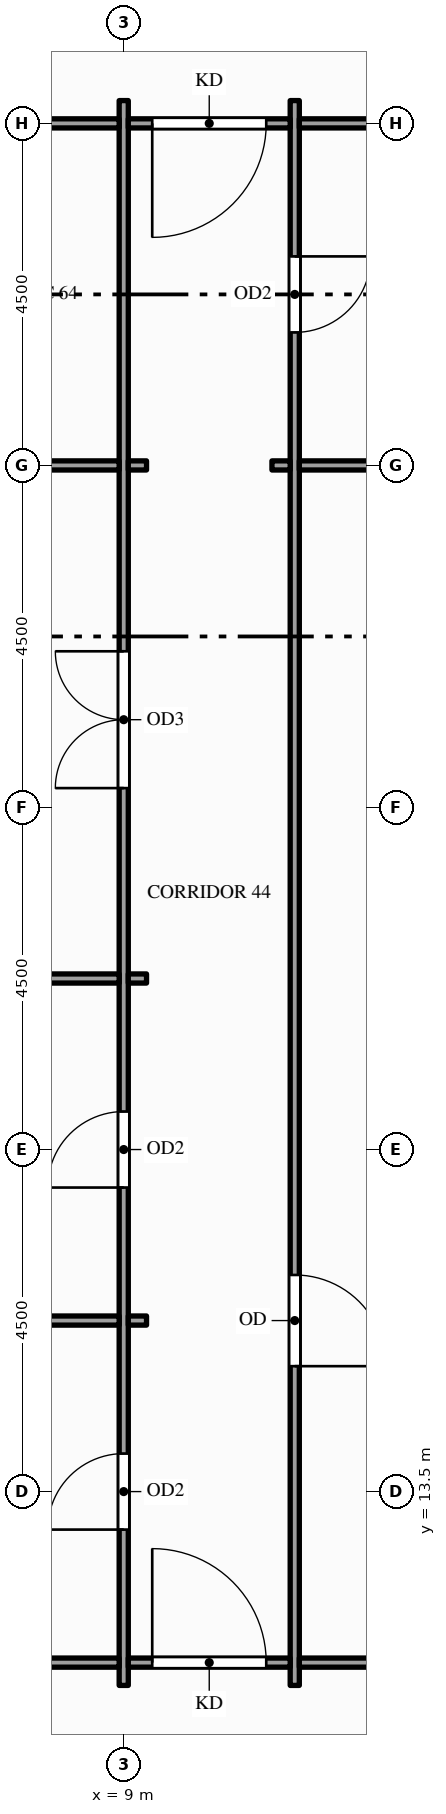
"""IFC4 building model, lengths in metres.
Left out: names, types, materials, properties, quantities, classifications, styles, units other than length and angle.
Written with IfcOpenShell. Run it as: python <this file> out.ifc"""

import sys

from ifc_helpers import new_model, si_unit, direction, frame, frame_2d, origin, place, context, subcontext, project, spatial, rectangle, extrude, element, fill, save


model = new_model("IFC4")
c1 = context("Model", 3, precision=1e-05, world=origin(), true_north=direction((0.0, 1.0)))
c2 = subcontext(c1, "Body", "Model", "MODEL_VIEW")
j1 = project(units=[si_unit("LENGTHUNIT", "METRE"), si_unit("PLANEANGLEUNIT", "RADIAN")], contexts=[c1])
p1 = place(None, origin())
s1 = spatial("IfcSite", under=j1, at=p1, CompositionType="ELEMENT")
p2 = place(p1, origin())
s2 = spatial("IfcBuilding", under=s1, at=p2, CompositionType="ELEMENT")
p3 = place(p2, frame((0.0, 0.0, 139.0)))
s3 = spatial("IfcBuildingStorey", under=s2, at=p3, CompositionType="ELEMENT", Elevation=139.0)
p4 = place(p3, frame((9.0, 10.95, 0.0), z_axis=(0.0, 0.0, 1.0), x_axis=(0.0, 1.0, 0.0)))
e1 = element("IfcWall", 1, at=p4, inside=s3, PredefinedType="PARTITIONING", context=c2, shape_type="SweptSolid", body=[
    extrude(rectangle(XDim=20.85, YDim=0.12, at=frame_2d((10.425, 0.0))), origin(), (0.0, 0.0, 1.0), 2.6),
])
p5 = place(p4, frame((2.05, 0.0, 0.0)))
e2 = element("IfcOpeningElement", 2, at=p5, cuts=e1, PredefinedType="OPENING", context=c2, shape_type="SweptSolid", body=[
    extrude(rectangle(XDim=1.0, YDim=2.1, at=frame_2d((0.5, 1.05))), frame((0.0, 0.07, 0.0), z_axis=(0.0, -1.0, 0.0), x_axis=(1.0, 0.0, 0.0)), (0.0, 0.0, 1.0), 0.14),
])
p6 = place(p4, frame((6.55, 0.0, 0.0)))
e3 = element("IfcOpeningElement", 3, at=p6, cuts=e1, PredefinedType="OPENING", context=c2, shape_type="SweptSolid", body=[
    extrude(rectangle(XDim=1.0, YDim=2.1, at=frame_2d((0.5, 1.05))), frame((0.0, 0.07, 0.0), z_axis=(0.0, -1.0, 0.0), x_axis=(1.0, 0.0, 0.0)), (0.0, 0.0, 1.0), 0.14),
])
p7 = place(p4, frame((11.805, 0.0, 0.0)))
e4 = element("IfcOpeningElement", 4, at=p7, cuts=e1, PredefinedType="OPENING", context=c2, shape_type="SweptSolid", body=[
    extrude(rectangle(XDim=1.8, YDim=2.1, at=frame_2d((0.9, 1.05))), frame((0.0, 0.07, 0.0), z_axis=(0.0, -1.0, 0.0), x_axis=(1.0, 0.0, 0.0)), (0.0, 0.0, 1.0), 0.14),
])
p8 = place(p3, frame((11.25, 10.95, 0.0), z_axis=(0.0, 0.0, 1.0), x_axis=(0.0, 1.0, 0.0)))
e5 = element("IfcWall", 5, at=p8, inside=s3, PredefinedType="PARTITIONING", context=c2, shape_type="SweptSolid", body=[
    extrude(rectangle(XDim=20.85, YDim=0.12, at=frame_2d((10.425, 0.0))), origin(), (0.0, 0.0, 1.0), 2.6),
])
p9 = place(p8, frame((17.8, 0.0, 0.0)))
e6 = element("IfcOpeningElement", 6, at=p9, cuts=e5, PredefinedType="OPENING", context=c2, shape_type="SweptSolid", body=[
    extrude(rectangle(XDim=1.0, YDim=2.1, at=frame_2d((0.5, 1.05))), frame((0.0, 0.07, 0.0), z_axis=(0.0, -1.0, 0.0), x_axis=(1.0, 0.0, 0.0)), (0.0, 0.0, 1.0), 0.14),
])
p10 = place(p8, frame((4.2, 0.0, 0.0)))
e7 = element("IfcOpeningElement", 7, at=p10, cuts=e5, PredefinedType="OPENING", context=c2, shape_type="SweptSolid", body=[
    extrude(rectangle(XDim=1.2, YDim=2.1, at=frame_2d((0.6, 1.05))), frame((0.0, 0.07, 0.0), z_axis=(0.0, -1.0, 0.0), x_axis=(1.0, 0.0, 0.0)), (0.0, 0.0, 1.0), 0.14),
])
p11 = place(p3, frame((0.15, 11.25, 0.0), z_axis=(0.0, 0.0, 1.0), x_axis=(1.0, 0.0, 0.0)))
e8 = element("IfcWall", 8, at=p11, inside=s3, PredefinedType="PARTITIONING", context=c2, shape_type="SweptSolid", body=[
    extrude(rectangle(XDim=8.79, YDim=0.12, at=frame_2d((4.395, 0.0))), origin(), (0.0, 0.0, 1.0), 2.87),
])
p12 = place(p3, frame((9.06, 11.25, 0.0), z_axis=(0.0, 0.0, 1.0), x_axis=(1.0, 0.0, 0.0)))
e9 = element("IfcWall", 9, at=p12, inside=s3, PredefinedType="PARTITIONING", context=c2, shape_type="SweptSolid", body=[
    extrude(rectangle(XDim=2.13, YDim=0.12, at=frame_2d((1.065, 0.0))), origin(), (0.0, 0.0, 1.0), 2.87),
])
p13 = place(p12, frame((0.315, 0.0, 0.0)))
e10 = element("IfcOpeningElement", 10, at=p13, cuts=e9, PredefinedType="OPENING", context=c2, shape_type="SweptSolid", body=[
    extrude(rectangle(XDim=1.5, YDim=2.1, at=frame_2d((0.75, 1.05))), frame((0.0, 0.07, 0.0), z_axis=(0.0, -1.0, 0.0), x_axis=(1.0, 0.0, 0.0)), (0.0, 0.0, 1.0), 0.14),
])
p14 = place(p3, frame((11.31, 11.25, 0.0), z_axis=(0.0, 0.0, 1.0), x_axis=(1.0, 0.0, 0.0)))
e11 = element("IfcWall", 11, at=p14, inside=s3, PredefinedType="PARTITIONING", context=c2, shape_type="SweptSolid", body=[
    extrude(rectangle(XDim=20.04, YDim=0.12, at=frame_2d((10.02, 0.0))), origin(), (0.0, 0.0, 1.0), 2.87),
])
p15 = place(p14, frame((9.165, 0.0, 0.0)))
e12 = element("IfcOpeningElement", 12, at=p15, cuts=e11, PredefinedType="OPENING", context=c2, shape_type="SweptSolid", body=[
    extrude(rectangle(XDim=1.8, YDim=2.1, at=frame_2d((0.9, 1.05))), frame((0.0, 0.07, 0.0), z_axis=(0.0, -1.0, 0.0), x_axis=(1.0, 0.0, 0.0)), (0.0, 0.0, 1.0), 0.14),
])
p16 = place(p3, frame((0.15, 15.75, 0.0), z_axis=(0.0, 0.0, 1.0), x_axis=(1.0, 0.0, 0.0)))
e13 = element("IfcWall", 13, at=p16, inside=s3, PredefinedType="PARTITIONING", context=c2, shape_type="SweptSolid", body=[
    extrude(rectangle(XDim=8.79, YDim=0.12, at=frame_2d((4.395, 0.0))), origin(), (0.0, 0.0, 1.0), 2.87),
])
p17 = place(p3, frame((9.06, 15.75, 0.0), z_axis=(0.0, 0.0, 1.0), x_axis=(1.0, 0.0, 0.0)))
e14 = element("IfcWall", 14, at=p17, inside=s3, PredefinedType="PARTITIONING", context=c2, shape_type="SweptSolid", body=[
    extrude(rectangle(XDim=0.24, YDim=0.12, at=frame_2d((0.12, 0.0))), origin(), (0.0, 0.0, 1.0), 2.87),
])
p18 = place(p3, frame((0.15, 20.25, 0.0), z_axis=(0.0, 0.0, 1.0), x_axis=(1.0, 0.0, 0.0)))
e15 = element("IfcWall", 15, at=p18, inside=s3, PredefinedType="PARTITIONING", context=c2, shape_type="SweptSolid", body=[
    extrude(rectangle(XDim=8.79, YDim=0.12, at=frame_2d((4.395, 0.0))), origin(), (0.0, 0.0, 1.0), 2.87),
])
p19 = place(p3, frame((9.06, 20.25, 0.0), z_axis=(0.0, 0.0, 1.0), x_axis=(1.0, 0.0, 0.0)))
e16 = element("IfcWall", 16, at=p19, inside=s3, PredefinedType="PARTITIONING", context=c2, shape_type="SweptSolid", body=[
    extrude(rectangle(XDim=0.24, YDim=0.12, at=frame_2d((0.12, 0.0))), origin(), (0.0, 0.0, 1.0), 2.87),
])
p20 = place(p3, frame((5.56, 27.0, 0.0), z_axis=(0.0, 0.0, 1.0), x_axis=(1.0, 0.0, 0.0)))
e17 = element("IfcWall", 17, at=p20, inside=s3, PredefinedType="PARTITIONING", context=c2, shape_type="SweptSolid", body=[
    extrude(rectangle(XDim=3.38, YDim=0.12, at=frame_2d((1.69, 0.0))), origin(), (0.0, 0.0, 1.0), 2.87),
])
for number, where, z_axis, x_axis in (
    (18, (9.06, 27.0, 0.0), (0.0, 0.0, 1.0), (1.0, 0.0, 0.0)),
    (19, (10.95, 27.0, 0.0), (0.0, 0.0, 1.0), (1.0, 0.0, 0.0)),
):
    element("IfcWall", number, at=place(p3, frame(where, z_axis=z_axis, x_axis=x_axis)), inside=s3, PredefinedType="PARTITIONING", context=c2, shape_type="SweptSolid", body=[
        extrude(rectangle(XDim=0.24, YDim=0.12, at=frame_2d((0.12, 0.0))), origin(), (0.0, 0.0, 1.0), 2.87),
    ])
p21 = place(p3, frame((11.31, 27.0, 0.0), z_axis=(0.0, 0.0, 1.0), x_axis=(1.0, 0.0, 0.0)))
e20 = element("IfcWall", 20, at=p21, inside=s3, PredefinedType="PARTITIONING", context=c2, shape_type="SweptSolid", body=[
    extrude(rectangle(XDim=9.82, YDim=0.12, at=frame_2d((4.91, 0.0))), origin(), (0.0, 0.0, 1.0), 2.87),
])
p22 = place(p3, frame((5.56, 31.5, 0.0), z_axis=(0.0, 0.0, 1.0), x_axis=(1.0, 0.0, 0.0)))
e21 = element("IfcWall", 21, at=p22, inside=s3, PredefinedType="PARTITIONING", context=c2, shape_type="SweptSolid", body=[
    extrude(rectangle(XDim=3.38, YDim=0.12, at=frame_2d((1.69, 0.0))), origin(), (0.0, 0.0, 1.0), 2.87),
])
p23 = place(p22, frame((1.19, 0.0, 0.0)))
e22 = element("IfcOpeningElement", 22, at=p23, cuts=e21, PredefinedType="OPENING", context=c2, shape_type="SweptSolid", body=[
    extrude(rectangle(XDim=1.0, YDim=2.1, at=frame_2d((0.5, 1.05))), frame((0.0, 0.07, 0.0), z_axis=(0.0, -1.0, 0.0), x_axis=(1.0, 0.0, 0.0)), (0.0, 0.0, 1.0), 0.14),
])
p24 = place(p3, frame((9.06, 31.5, 0.0), z_axis=(0.0, 0.0, 1.0), x_axis=(1.0, 0.0, 0.0)))
e23 = element("IfcWall", 23, at=p24, inside=s3, PredefinedType="PARTITIONING", context=c2, shape_type="SweptSolid", body=[
    extrude(rectangle(XDim=2.13, YDim=0.12, at=frame_2d((1.065, 0.0))), origin(), (0.0, 0.0, 1.0), 2.87),
])
p25 = place(p24, frame((0.315, 0.0, 0.0)))
e24 = element("IfcOpeningElement", 24, at=p25, cuts=e23, PredefinedType="OPENING", context=c2, shape_type="SweptSolid", body=[
    extrude(rectangle(XDim=1.5, YDim=2.1, at=frame_2d((0.75, 1.05))), frame((0.0, 0.07, 0.0), z_axis=(0.0, -1.0, 0.0), x_axis=(1.0, 0.0, 0.0)), (0.0, 0.0, 1.0), 0.14),
])
p26 = place(p3, frame((11.31, 31.5, 0.0), z_axis=(0.0, 0.0, 1.0), x_axis=(1.0, 0.0, 0.0)))
e25 = element("IfcWall", 25, at=p26, inside=s3, PredefinedType="PARTITIONING", context=c2, shape_type="SweptSolid", body=[
    extrude(rectangle(XDim=9.54, YDim=0.12, at=frame_2d((4.77, 0.0))), origin(), (0.0, 0.0, 1.0), 2.87),
])
p27 = place(p13, origin())
e26 = element("IfcDoor", 26, at=p27, inside=s3, OperationType="SINGLE_SWING_LEFT", PredefinedType="DOOR", context=c2, shape_type="SweptSolid", body=[
    extrude(rectangle(XDim=1.5, YDim=2.1, at=frame_2d((0.75, 1.05))), frame((0.0, 0.025, 0.0), z_axis=(0.0, -1.0, 0.0), x_axis=(1.0, 0.0, 0.0)), (0.0, 0.0, 1.0), 0.05),
])
fill(e10, e26)
p28 = place(p25, origin())
e27 = element("IfcDoor", 27, at=p28, inside=s3, OperationType="SINGLE_SWING_LEFT", PredefinedType="DOOR", context=c2, shape_type="SweptSolid", body=[
    extrude(rectangle(XDim=1.5, YDim=2.1, at=frame_2d((0.75, 1.05))), frame((0.0, 0.025, 0.0), z_axis=(0.0, -1.0, 0.0), x_axis=(1.0, 0.0, 0.0)), (0.0, 0.0, 1.0), 0.05),
])
fill(e24, e27)
p29 = place(p5, origin())
e28 = element("IfcDoor", 28, at=p29, inside=s3, OperationType="SINGLE_SWING_LEFT", PredefinedType="DOOR", context=c2, shape_type="SweptSolid", body=[
    extrude(rectangle(XDim=1.0, YDim=2.1, at=frame_2d((0.5, 1.05))), frame((0.0, 0.025, 0.0), z_axis=(0.0, -1.0, 0.0), x_axis=(1.0, 0.0, 0.0)), (0.0, 0.0, 1.0), 0.05),
])
fill(e2, e28)
p30 = place(p6, origin())
e29 = element("IfcDoor", 29, at=p30, inside=s3, OperationType="SINGLE_SWING_LEFT", PredefinedType="DOOR", context=c2, shape_type="SweptSolid", body=[
    extrude(rectangle(XDim=1.0, YDim=2.1, at=frame_2d((0.5, 1.05))), frame((0.0, 0.025, 0.0), z_axis=(0.0, -1.0, 0.0), x_axis=(1.0, 0.0, 0.0)), (0.0, 0.0, 1.0), 0.05),
])
fill(e3, e29)
p31 = place(p7, origin())
e30 = element("IfcDoor", 30, at=p31, inside=s3, OperationType="DOUBLE_DOOR_SINGLE_SWING", PredefinedType="DOOR", context=c2, shape_type="SweptSolid", body=[
    extrude(rectangle(XDim=1.8, YDim=2.1, at=frame_2d((0.9, 1.05))), frame((0.0, 0.025, 0.0), z_axis=(0.0, -1.0, 0.0), x_axis=(1.0, 0.0, 0.0)), (0.0, 0.0, 1.0), 0.05),
])
fill(e4, e30)
p32 = place(p9, origin())
e31 = element("IfcDoor", 31, at=p32, inside=s3, OperationType="SINGLE_SWING_RIGHT", PredefinedType="DOOR", context=c2, shape_type="SweptSolid", body=[
    extrude(rectangle(XDim=1.0, YDim=2.1, at=frame_2d((0.5, 1.05))), frame((0.0, 0.025, 0.0), z_axis=(0.0, -1.0, 0.0), x_axis=(1.0, 0.0, 0.0)), (0.0, 0.0, 1.0), 0.05),
])
fill(e6, e31)
p33 = place(p10, origin())
e32 = element("IfcDoor", 32, at=p33, inside=s3, OperationType="SINGLE_SWING_LEFT", PredefinedType="DOOR", context=c2, shape_type="SweptSolid", body=[
    extrude(rectangle(XDim=1.2, YDim=2.1, at=frame_2d((0.6, 1.05))), frame((0.0, 0.025, 0.0), z_axis=(0.0, -1.0, 0.0), x_axis=(1.0, 0.0, 0.0)), (0.0, 0.0, 1.0), 0.05),
])
fill(e7, e32)
save(model, sys.argv[1])
